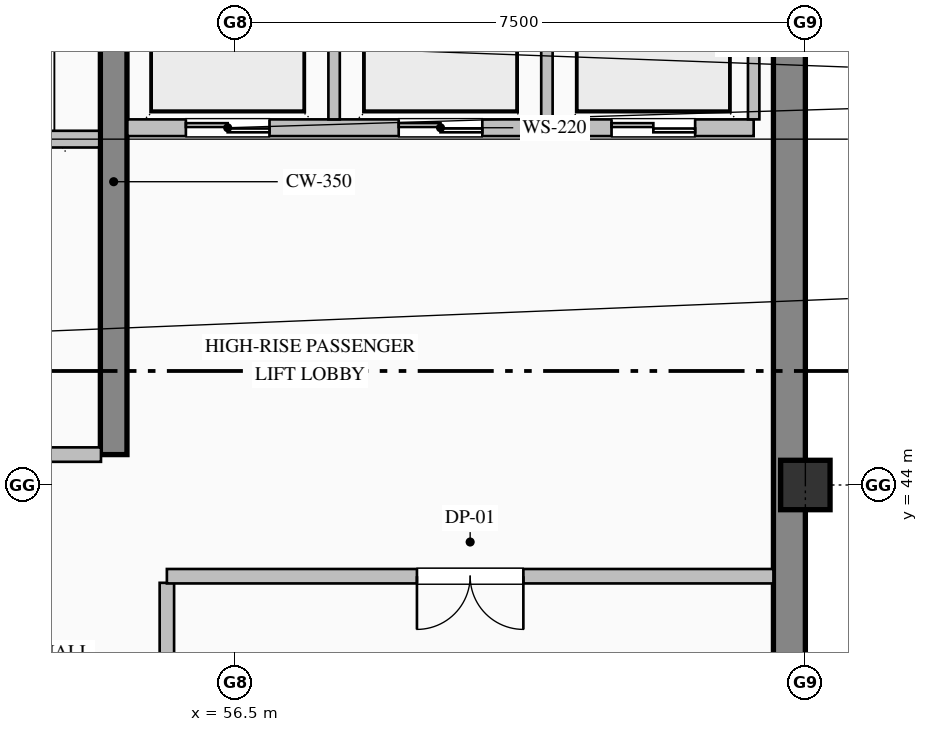
"""IFC4 building model, lengths in metres.
Left out: names, types, materials, properties, quantities, classifications, styles, units other than length and angle.
Written with IfcOpenShell. Run it as: python <this file> out.ifc"""

import sys

from ifc_helpers import new_model, si_unit, direction, frame, frame_2d, origin, origin_2d, place, context, subcontext, project, spatial, rectangle, hollow_rectangle, extrude, element, fill, save


model = new_model("IFC4")
c1 = context("Model", 3, precision=1e-05, world=origin(), true_north=direction((0.0, 1.0)))
c2 = subcontext(c1, "Body", "Model", "MODEL_VIEW")
j1 = project(units=[si_unit("LENGTHUNIT", "METRE"), si_unit("PLANEANGLEUNIT", "RADIAN")], contexts=[c1])
p1 = place(None, origin())
s1 = spatial("IfcSite", under=j1, at=p1, CompositionType="ELEMENT")
p2 = place(p1, origin())
s2 = spatial("IfcBuilding", under=s1, at=p2, CompositionType="ELEMENT")
p3 = place(p2, frame((0.0, 0.0, 367.2)))
s3 = spatial("IfcBuildingStorey", under=s2, at=p3, CompositionType="ELEMENT", Elevation=367.2)
p4 = place(p3, frame((63.79, 36.32, 0.0), z_axis=(0.0, 0.0, 1.0), x_axis=(0.0, 1.0, 0.0)))
e1 = element("IfcWall", 1, at=p4, inside=s3, PredefinedType="SHEAR", context=c2, shape_type="SweptSolid", body=[
    extrude(rectangle(XDim=15.26, YDim=0.42, at=frame_2d((7.63, 0.0))), origin(), (0.0, 0.0, 1.0), 5.39),
])
p5 = place(p3, frame((54.9, 44.4, 0.0), z_axis=(0.0, 0.0, 1.0), x_axis=(0.0, 1.0, 0.0)))
e2 = element("IfcWall", 2, at=p5, inside=s3, PredefinedType="SHEAR", context=c2, shape_type="SweptSolid", body=[
    extrude(rectangle(XDim=7.18, YDim=0.35, at=frame_2d((3.59, 0.0))), origin(), (0.0, 0.0, 1.0), 5.39),
])
p6 = place(p3, frame((64.0, 44.0, 0.0), z_axis=(0.0, 0.0, 1.0), x_axis=(1.0, 0.0, 0.0)))
e3 = element("IfcColumn", 3, at=p6, inside=s3, PredefinedType="COLUMN", context=c2, shape_type="SweptSolid", body=[
    extrude(hollow_rectangle(XDim=0.65, YDim=0.65, WallThickness=0.028, at=origin_2d()), origin(), (0.0, 0.0, 1.0), 5.8),
])
p7 = place(p3, frame((54.71, 48.55, 0.0), z_axis=(0.0, 0.0, 1.0), x_axis=(-1.0, 0.0, 0.0)))
e4 = element("IfcWall", 4, at=p7, inside=s3, PredefinedType="PARTITIONING", context=c2, shape_type="SweptSolid", body=[
    extrude(rectangle(XDim=5.12, YDim=0.22, at=frame_2d((2.56, 0.0))), origin(), (0.0, 0.0, 1.0), 5.39),
])
p8 = place(p7, frame((3.735, 0.0, 0.0)))
e5 = element("IfcOpeningElement", 5, at=p8, cuts=e4, PredefinedType="OPENING", context=c2, shape_type="SweptSolid", body=[
    extrude(rectangle(XDim=1.15, YDim=2.2, at=frame_2d((0.575, 1.1))), frame((0.0, 0.12, 0.0), z_axis=(0.0, -1.0, 0.0), x_axis=(1.0, 0.0, 0.0)), (0.0, 0.0, 1.0), 0.24),
])
p9 = place(p7, frame((0.935, 0.0, 0.0)))
e6 = element("IfcOpeningElement", 6, at=p9, cuts=e4, PredefinedType="OPENING", context=c2, shape_type="SweptSolid", body=[
    extrude(rectangle(XDim=1.15, YDim=2.2, at=frame_2d((0.575, 1.1))), frame((0.0, 0.12, 0.0), z_axis=(0.0, -1.0, 0.0), x_axis=(1.0, 0.0, 0.0)), (0.0, 0.0, 1.0), 0.24),
])
p10 = place(p3, frame((63.32, 48.7, 0.0), z_axis=(0.0, 0.0, 1.0), x_axis=(-1.0, 0.0, 0.0)))
e7 = element("IfcWall", 7, at=p10, inside=s3, PredefinedType="PARTITIONING", context=c2, shape_type="SweptSolid", body=[
    extrude(rectangle(XDim=8.24, YDim=0.22, at=frame_2d((4.12, 0.0))), origin(), (0.0, 0.0, 1.0), 5.39),
])
p11 = place(p10, frame((6.37, 0.0, 0.0)))
e8 = element("IfcOpeningElement", 8, at=p11, cuts=e7, PredefinedType="OPENING", context=c2, shape_type="SweptSolid", body=[
    extrude(rectangle(XDim=1.1, YDim=2.2, at=frame_2d((0.55, 1.1))), frame((0.0, 0.12, 0.0), z_axis=(0.0, -1.0, 0.0), x_axis=(1.0, 0.0, 0.0)), (0.0, 0.0, 1.0), 0.24),
])
p12 = place(p10, frame((3.57, 0.0, 0.0)))
e9 = element("IfcOpeningElement", 9, at=p12, cuts=e7, PredefinedType="OPENING", context=c2, shape_type="SweptSolid", body=[
    extrude(rectangle(XDim=1.1, YDim=2.2, at=frame_2d((0.55, 1.1))), frame((0.0, 0.12, 0.0), z_axis=(0.0, -1.0, 0.0), x_axis=(1.0, 0.0, 0.0)), (0.0, 0.0, 1.0), 0.24),
])
p13 = place(p10, frame((0.77, 0.0, 0.0)))
e10 = element("IfcOpeningElement", 10, at=p13, cuts=e7, PredefinedType="OPENING", context=c2, shape_type="SweptSolid", body=[
    extrude(rectangle(XDim=1.1, YDim=2.2, at=frame_2d((0.55, 1.1))), frame((0.0, 0.12, 0.0), z_axis=(0.0, -1.0, 0.0), x_axis=(1.0, 0.0, 0.0)), (0.0, 0.0, 1.0), 0.24),
])
for number, where, z_axis, x_axis in (
    (11, (57.8, 48.81, 0.0), (0.0, 0.0, 1.0), (0.0, 1.0, 0.0)),
    (12, (60.6, 48.81, 0.0), (0.0, 0.0, 1.0), (0.0, 1.0, 0.0)),
    (13, (63.32, 48.81, 0.0), (0.0, 0.0, 1.0), (0.0, 1.0, 0.0)),
):
    element("IfcWall", number, at=place(p3, frame(where, z_axis=z_axis, x_axis=x_axis)), inside=s3, PredefinedType="PARTITIONING", context=c2, shape_type="SweptSolid", body=[
        extrude(rectangle(XDim=2.77, YDim=0.15, at=frame_2d((1.385, 0.0))), origin(), (0.0, 0.0, 1.0), 5.39),
    ])
p14 = place(p3, frame((54.733, 44.4, 0.0), z_axis=(0.0, 0.0, 1.0), x_axis=(-1.0, 0.0, 0.0)))
e14 = element("IfcWall", 14, at=p14, inside=s3, PredefinedType="PARTITIONING", context=c2, shape_type="SweptSolid", body=[
    extrude(rectangle(XDim=5.166, YDim=0.19, at=frame_2d((2.583, 0.0))), origin(), (0.0, 0.0, 1.0), 5.39),
])
p15 = place(p14, frame((2.058, 0.0, 0.0)))
e15 = element("IfcOpeningElement", 15, at=p15, cuts=e14, PredefinedType="OPENING", context=c2, shape_type="SweptSolid", body=[
    extrude(rectangle(XDim=1.05, YDim=2.15, at=frame_2d((0.525, 1.075))), frame((0.0, 0.105, 0.0), z_axis=(0.0, -1.0, 0.0), x_axis=(1.0, 0.0, 0.0)), (0.0, 0.0, 1.0), 0.21),
])
p16 = place(p3, frame((55.6, 42.713, 0.0), z_axis=(0.0, 0.0, 1.0), x_axis=(0.0, -1.0, 0.0)))
e16 = element("IfcWall", 16, at=p16, inside=s3, PredefinedType="PARTITIONING", context=c2, shape_type="SweptSolid", body=[
    extrude(rectangle(XDim=2.731, YDim=0.19, at=frame_2d((1.365, 0.0))), origin(), (0.0, 0.0, 1.0), 5.39),
])
p17 = place(p3, frame((63.58, 42.8, 0.0), z_axis=(0.0, 0.0, 1.0), x_axis=(-1.0, 0.0, 0.0)))
e17 = element("IfcWall", 17, at=p17, inside=s3, PredefinedType="PARTITIONING", context=c2, shape_type="SweptSolid", body=[
    extrude(rectangle(XDim=7.98, YDim=0.19, at=frame_2d((3.99, 0.0))), origin(), (0.0, 0.0, 1.0), 5.39),
])
p18 = place(p17, frame((3.29, 0.0, 0.0)))
e18 = element("IfcOpeningElement", 18, at=p18, cuts=e17, PredefinedType="OPENING", context=c2, shape_type="SweptSolid", body=[
    extrude(rectangle(XDim=1.4, YDim=2.25, at=frame_2d((0.7, 1.125))), frame((0.0, 0.105, 0.0), z_axis=(0.0, -1.0, 0.0), x_axis=(1.0, 0.0, 0.0)), (0.0, 0.0, 1.0), 0.21),
])
p19 = place(p11, origin())
e19 = element("IfcDoor", 19, at=p19, inside=s3, OperationType="DOUBLE_DOOR_SLIDING", PredefinedType="DOOR", context=c2, shape_type="SweptSolid", body=[
    extrude(rectangle(XDim=1.1, YDim=2.2, at=frame_2d((0.55, 1.1))), frame((0.0, 0.025, 0.0), z_axis=(0.0, -1.0, 0.0), x_axis=(1.0, 0.0, 0.0)), (0.0, 0.0, 1.0), 0.05),
])
fill(e8, e19)
p20 = place(p12, origin())
e20 = element("IfcDoor", 20, at=p20, inside=s3, OperationType="DOUBLE_DOOR_SLIDING", PredefinedType="DOOR", context=c2, shape_type="SweptSolid", body=[
    extrude(rectangle(XDim=1.1, YDim=2.2, at=frame_2d((0.55, 1.1))), frame((0.0, 0.025, 0.0), z_axis=(0.0, -1.0, 0.0), x_axis=(1.0, 0.0, 0.0)), (0.0, 0.0, 1.0), 0.05),
])
fill(e9, e20)
p21 = place(p13, origin())
e21 = element("IfcDoor", 21, at=p21, inside=s3, OperationType="DOUBLE_DOOR_SLIDING", PredefinedType="DOOR", context=c2, shape_type="SweptSolid", body=[
    extrude(rectangle(XDim=1.1, YDim=2.2, at=frame_2d((0.55, 1.1))), frame((0.0, 0.025, 0.0), z_axis=(0.0, -1.0, 0.0), x_axis=(1.0, 0.0, 0.0)), (0.0, 0.0, 1.0), 0.05),
])
fill(e10, e21)
p22 = place(p18, origin())
e22 = element("IfcDoor", 22, at=p22, inside=s3, OperationType="DOUBLE_DOOR_SINGLE_SWING", PredefinedType="DOOR", context=c2, shape_type="SweptSolid", body=[
    extrude(rectangle(XDim=1.4, YDim=2.25, at=frame_2d((0.7, 1.125))), frame((0.0, 0.025, 0.0), z_axis=(0.0, -1.0, 0.0), x_axis=(1.0, 0.0, 0.0)), (0.0, 0.0, 1.0), 0.05),
])
fill(e18, e22)
save(model, sys.argv[1])
